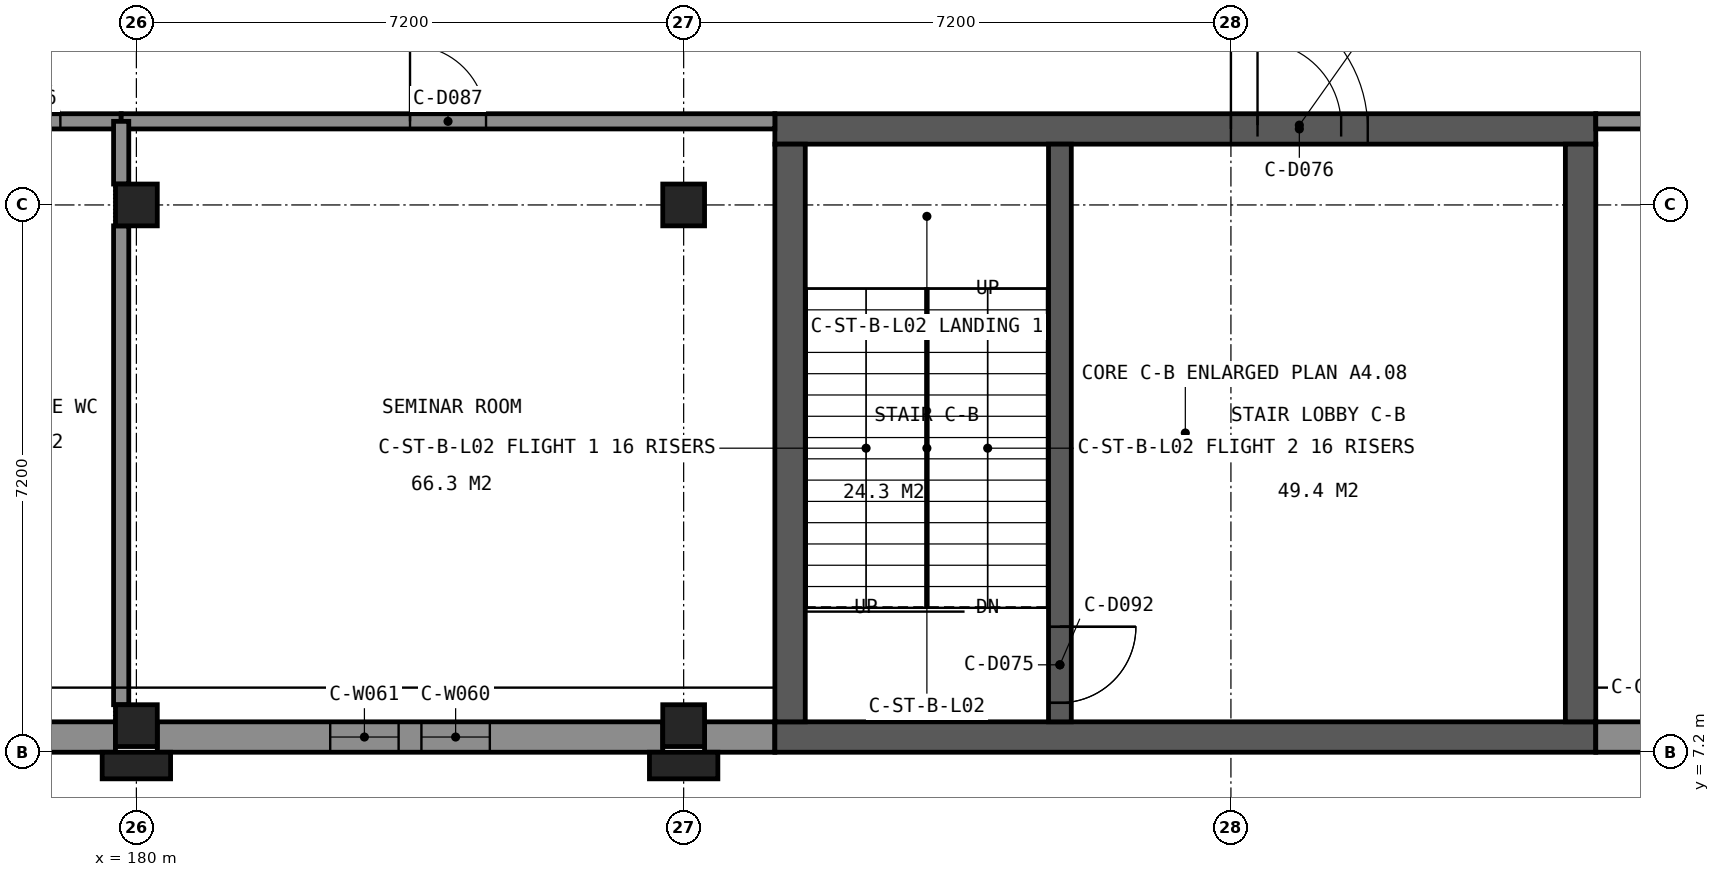
"""IFC4 building model, lengths in metres.
Left out: names, types, materials, properties, quantities, classifications, styles, units other than length and angle.
Written with IfcOpenShell. Run it as: python <this file> out.ifc"""

import sys

from ifc_helpers import new_model, si_unit, direction, frame, frame_2d, origin, origin_2d, place, context, subcontext, project, spatial, polyline, rectangle, outline, extrude, element, fill, save


model = new_model("IFC4")
c1 = context("Model", 3, precision=1e-05, world=origin(), true_north=direction((0.0, 1.0)))
c2 = subcontext(c1, "Body", "Model", "MODEL_VIEW")
j1 = project(units=[si_unit("LENGTHUNIT", "METRE"), si_unit("PLANEANGLEUNIT", "RADIAN")], contexts=[c1])
p1 = place(None, origin())
s1 = spatial("IfcSite", under=j1, at=p1, CompositionType="ELEMENT")
p2 = place(p1, origin())
s2 = spatial("IfcBuilding", under=s1, at=p2, CompositionType="ELEMENT")
p3 = place(p2, frame((0.0, 0.0, 14.4)))
s3 = spatial("IfcBuildingStorey", under=s2, at=p3, CompositionType="ELEMENT", Elevation=14.4)
for number, where, z_axis, x_axis in (
    (1, (180.0, 14.4, 0.0), (0.0, 0.0, 1.0), (1.0, 0.0, 0.0)),
    (2, (187.2, 14.4, 0.0), (0.0, 0.0, 1.0), (1.0, 0.0, 0.0)),
    (3, (180.0, 7.55, 0.0), (0.0, 0.0, 1.0), (1.0, 0.0, 0.0)),
    (4, (187.2, 7.55, 0.0), (0.0, 0.0, 1.0), (1.0, 0.0, 0.0)),
):
    element("IfcColumn", number, at=place(p3, frame(where, z_axis=z_axis, x_axis=x_axis)), inside=s3, PredefinedType="COLUMN", context=c2, shape_type="SweptSolid", body=[
        extrude(rectangle(XDim=0.55, YDim=0.55, at=origin_2d()), origin(), (0.0, 0.0, 1.0), 4.8),
    ])
p4 = place(p3, frame((179.725, 7.4, 0.0), z_axis=(0.0, 0.0, 1.0), x_axis=(-1.0, 0.0, 0.0)))
e5 = element("IfcWall", 5, at=p4, inside=s3, PredefinedType="SOLIDWALL", context=c2, shape_type="SweptSolid", body=[
    extrude(rectangle(XDim=6.65, YDim=0.4, at=frame_2d((3.325, 0.0))), origin(), (0.0, 0.0, 1.0), 3.7),
])
p5 = place(p4, frame((3.475, 0.0, 1.8)))
e6 = element("IfcOpeningElement", 6, at=p5, cuts=e5, PredefinedType="OPENING", context=c2, shape_type="SweptSolid", body=[
    extrude(rectangle(XDim=0.9, YDim=1.2, at=frame_2d((0.45, 0.6))), frame((0.0, 0.21, 0.0), z_axis=(0.0, -1.0, 0.0), x_axis=(1.0, 0.0, 0.0)), (0.0, 0.0, 1.0), 0.42),
])
p6 = place(p3, frame((186.925, 7.4, 0.0), z_axis=(0.0, 0.0, 1.0), x_axis=(-1.0, 0.0, 0.0)))
e7 = element("IfcWall", 7, at=p6, inside=s3, PredefinedType="SOLIDWALL", context=c2, shape_type="SweptSolid", body=[
    extrude(rectangle(XDim=6.65, YDim=0.4, at=frame_2d((3.325, 0.0))), origin(), (0.0, 0.0, 1.0), 3.7),
])
p7 = place(p6, frame((2.275, 0.0, 1.8)))
e8 = element("IfcOpeningElement", 8, at=p7, cuts=e7, PredefinedType="OPENING", context=c2, shape_type="SweptSolid", body=[
    extrude(rectangle(XDim=0.9, YDim=1.2, at=frame_2d((0.45, 0.6))), frame((0.0, 0.21, 0.0), z_axis=(0.0, -1.0, 0.0), x_axis=(1.0, 0.0, 0.0)), (0.0, 0.0, 1.0), 0.42),
])
p8 = place(p6, frame((3.475, 0.0, 1.8)))
e9 = element("IfcOpeningElement", 9, at=p8, cuts=e7, PredefinedType="OPENING", context=c2, shape_type="SweptSolid", body=[
    extrude(rectangle(XDim=0.9, YDim=1.2, at=frame_2d((0.45, 0.6))), frame((0.0, 0.21, 0.0), z_axis=(0.0, -1.0, 0.0), x_axis=(1.0, 0.0, 0.0)), (0.0, 0.0, 1.0), 0.42),
])
p9 = place(p3, frame((188.4, 7.4, 0.0), z_axis=(0.0, 0.0, 1.0), x_axis=(-1.0, 0.0, 0.0)))
e10 = element("IfcWall", 10, at=p9, inside=s3, PredefinedType="SOLIDWALL", context=c2, shape_type="SweptSolid", body=[
    extrude(rectangle(XDim=0.925, YDim=0.4, at=frame_2d((0.462, 0.0))), origin(), (0.0, 0.0, 1.0), 3.7),
])
p10 = place(p3, frame((199.2, 7.4, 0.0), z_axis=(0.0, 0.0, 1.0), x_axis=(-1.0, 0.0, 0.0)))
e11 = element("IfcWall", 11, at=p10, inside=s3, PredefinedType="SHEAR", context=c2, shape_type="SweptSolid", body=[
    extrude(rectangle(XDim=10.8, YDim=0.4, at=frame_2d((5.4, 0.0))), origin(), (0.0, 0.0, 1.0), 4.5),
])
p11 = place(p3, frame((201.325, 7.4, 0.0), z_axis=(0.0, 0.0, 1.0), x_axis=(-1.0, 0.0, 0.0)))
e12 = element("IfcWall", 12, at=p11, inside=s3, PredefinedType="SOLIDWALL", context=c2, shape_type="SweptSolid", body=[
    extrude(rectangle(XDim=2.125, YDim=0.4, at=frame_2d((1.062, 0.0))), origin(), (0.0, 0.0, 1.0), 3.7),
])
p12 = place(p3, frame((188.4, 15.4, 0.0), z_axis=(0.0, 0.0, 1.0), x_axis=(1.0, 0.0, 0.0)))
e13 = element("IfcWall", 13, at=p12, inside=s3, PredefinedType="SHEAR", context=c2, shape_type="SweptSolid", body=[
    extrude(rectangle(XDim=10.8, YDim=0.4, at=frame_2d((5.4, 0.0))), origin(), (0.0, 0.0, 1.0), 4.5),
])
p13 = place(p12, frame((6.0, 0.0, 0.0)))
e14 = element("IfcOpeningElement", 14, at=p13, cuts=e13, PredefinedType="OPENING", context=c2, shape_type="SweptSolid", body=[
    extrude(rectangle(XDim=1.8, YDim=2.1, at=frame_2d((0.9, 1.05))), frame((0.0, 0.21, 0.0), z_axis=(0.0, -1.0, 0.0), x_axis=(1.0, 0.0, 0.0)), (0.0, 0.0, 1.0), 0.42),
])
for number, where, z_axis, x_axis in (
    (15, (188.6, 15.2, 0.0), (0.0, 0.0, 1.0), (0.0, -1.0, 0.0)),
    (16, (199.0, 15.2, 0.0), (0.0, 0.0, 1.0), (0.0, -1.0, 0.0)),
):
    element("IfcWall", number, at=place(p3, frame(where, z_axis=z_axis, x_axis=x_axis)), inside=s3, PredefinedType="SHEAR", context=c2, shape_type="SweptSolid", body=[
        extrude(rectangle(XDim=7.6, YDim=0.4, at=frame_2d((3.8, 0.0))), origin(), (0.0, 0.0, 1.0), 4.5),
    ])
p14 = place(p3, frame((192.15, 15.2, 0.0), z_axis=(0.0, 0.0, 1.0), x_axis=(0.0, -1.0, 0.0)))
e17 = element("IfcWall", 17, at=p14, inside=s3, PredefinedType="SHEAR", context=c2, shape_type="SweptSolid", body=[
    extrude(rectangle(XDim=7.6, YDim=0.3, at=frame_2d((3.8, 0.0))), origin(), (0.0, 0.0, 1.0), 4.5),
])
p15 = place(p14, frame((6.35, 0.0, 0.0)))
e18 = element("IfcOpeningElement", 18, at=p15, cuts=e17, PredefinedType="OPENING", context=c2, shape_type="SweptSolid", body=[
    extrude(rectangle(XDim=1.0, YDim=2.1, at=frame_2d((0.5, 1.05))), frame((0.0, 0.16, 0.0), z_axis=(0.0, -1.0, 0.0), x_axis=(1.0, 0.0, 0.0)), (0.0, 0.0, 1.0), 0.32),
])
p16 = place(p3, frame((188.4, 7.4, 4.8), z_axis=(0.0, 0.0, 1.0), x_axis=(-1.0, 0.0, 0.0)))
e19 = element("IfcWall", 19, at=p16, inside=s3, PredefinedType="PARAPET", context=c2, shape_type="SweptSolid", body=[
    extrude(rectangle(XDim=19.2, YDim=0.4, at=frame_2d((9.6, 0.0))), origin(), (0.0, 0.0, 1.0), 0.4),
])
p17 = place(p3, frame((219.6, 7.4, 4.8), z_axis=(0.0, 0.0, 1.0), x_axis=(-1.0, 0.0, 0.0)))
e20 = element("IfcWall", 20, at=p17, inside=s3, PredefinedType="PARAPET", context=c2, shape_type="SweptSolid", body=[
    extrude(rectangle(XDim=20.4, YDim=0.4, at=frame_2d((10.2, 0.0))), origin(), (0.0, 0.0, 1.0), 0.4),
])
p18 = place(p3, frame((188.4, 15.45, 4.8), z_axis=(0.0, 0.0, 1.0), x_axis=(1.0, 0.0, 0.0)))
e21 = element("IfcWall", 21, at=p18, inside=s3, PredefinedType="SOLIDWALL", context=c2, shape_type="SweptSolid", body=[
    extrude(outline(polyline([(0.0, 0.0), (10.8, 0.0), (10.8, 2.15), (5.4, 2.45), (0.0, 2.15), (0.0, 0.0)])), frame((0.0, 0.15, 0.0), z_axis=(0.0, -1.0, 0.0), x_axis=(1.0, 0.0, 0.0)), (0.0, 0.0, 1.0), 0.3),
])
p19 = place(p18, frame((6.35, 0.0, 0.0)))
e22 = element("IfcOpeningElement", 22, at=p19, cuts=e21, PredefinedType="OPENING", context=c2, shape_type="SweptSolid", body=[
    extrude(rectangle(XDim=1.1, YDim=2.1, at=frame_2d((0.55, 1.05))), frame((0.0, 0.16, 0.0), z_axis=(0.0, -1.0, 0.0), x_axis=(1.0, 0.0, 0.0)), (0.0, 0.0, 1.0), 0.32),
])
p20 = place(p3, frame((188.4, 7.35, 4.8), z_axis=(0.0, 0.0, 1.0), x_axis=(1.0, 0.0, 0.0)))
e23 = element("IfcWall", 23, at=p20, inside=s3, PredefinedType="SOLIDWALL", context=c2, shape_type="SweptSolid", body=[
    extrude(outline(polyline([(0.0, 0.0), (10.8, 0.0), (10.8, 2.15), (5.4, 2.45), (0.0, 2.15), (0.0, 0.0)])), frame((0.0, 0.15, 0.0), z_axis=(0.0, -1.0, 0.0), x_axis=(1.0, 0.0, 0.0)), (0.0, 0.0, 1.0), 0.3),
])
for number, where, z_axis, x_axis in (
    (24, (188.55, 15.3, 4.8), (0.0, 0.0, 1.0), (0.0, -1.0, 0.0)),
    (25, (199.05, 15.3, 4.8), (0.0, 0.0, 1.0), (0.0, -1.0, 0.0)),
):
    element("IfcWall", number, at=place(p3, frame(where, z_axis=z_axis, x_axis=x_axis)), inside=s3, PredefinedType="SOLIDWALL", context=c2, shape_type="SweptSolid", body=[
        extrude(rectangle(XDim=7.8, YDim=0.3, at=frame_2d((3.9, 0.0))), origin(), (0.0, 0.0, 1.0), 2.15),
    ])
p21 = place(p3, frame((192.15, 15.3, 4.8), z_axis=(0.0, 0.0, 1.0), x_axis=(0.0, -1.0, 0.0)))
e26 = element("IfcWall", 26, at=p21, inside=s3, PredefinedType="SOLIDWALL", context=c2, shape_type="SweptSolid", body=[
    extrude(rectangle(XDim=7.8, YDim=0.3, at=frame_2d((3.9, 0.0))), origin(), (0.0, 0.0, 1.0), 2.15),
])
p22 = place(p21, frame((6.45, 0.0, 0.0)))
e27 = element("IfcOpeningElement", 27, at=p22, cuts=e26, PredefinedType="OPENING", context=c2, shape_type="SweptSolid", body=[
    extrude(rectangle(XDim=1.0, YDim=2.1, at=frame_2d((0.5, 1.05))), frame((0.0, 0.16, 0.0), z_axis=(0.0, -1.0, 0.0), x_axis=(1.0, 0.0, 0.0)), (0.0, 0.0, 1.0), 0.32),
])
for number, where, z_axis, x_axis in (
    (28, (180.0, 7.025, 0.0), (0.0, 0.0, 1.0), (1.0, 0.0, 0.0)),
    (29, (187.2, 7.025, 0.0), (0.0, 0.0, 1.0), (1.0, 0.0, 0.0)),
):
    element("IfcColumn", number, at=place(p3, frame(where, z_axis=z_axis, x_axis=x_axis)), inside=s3, PredefinedType="PILASTER", context=c2, shape_type="SweptSolid", body=[
        extrude(rectangle(XDim=0.9, YDim=0.35, at=origin_2d()), origin(), (0.0, 0.0, 1.0), 3.9),
    ])
p23 = place(p3, frame((230.4, 6.575, 4.5), z_axis=(0.0, 0.0, 1.0), x_axis=(-1.0, 0.0, 0.0)))
e30 = element("IfcWall", 30, at=p23, inside=s3, PredefinedType="SOLIDWALL", context=c2, shape_type="SweptSolid", body=[
    extrude(rectangle(XDim=72.75, YDim=0.25, at=frame_2d((36.375, 0.0))), origin(), (0.0, 0.0, 1.0), 0.65),
])
p24 = place(p3, frame((177.2, 15.5, 0.0), z_axis=(0.0, 0.0, 1.0), x_axis=(1.0, 0.0, 0.0)))
e31 = element("IfcWall", 31, at=p24, inside=s3, PredefinedType="PARTITIONING", context=c2, shape_type="SweptSolid", body=[
    extrude(rectangle(XDim=2.6, YDim=0.2, at=frame_2d((1.3, 0.0))), origin(), (0.0, 0.0, 1.0), 3.7),
])
p25 = place(p24, frame((0.8, 0.0, 0.0)))
e32 = element("IfcOpeningElement", 32, at=p25, cuts=e31, PredefinedType="OPENING", context=c2, shape_type="SweptSolid", body=[
    extrude(rectangle(XDim=1.0, YDim=2.1, at=frame_2d((0.5, 1.05))), frame((0.0, 0.11, 0.0), z_axis=(0.0, -1.0, 0.0), x_axis=(1.0, 0.0, 0.0)), (0.0, 0.0, 1.0), 0.22),
])
p26 = place(p3, frame((179.8, 15.5, 0.0), z_axis=(0.0, 0.0, 1.0), x_axis=(1.0, 0.0, 0.0)))
e33 = element("IfcWall", 33, at=p26, inside=s3, PredefinedType="PARTITIONING", context=c2, shape_type="SweptSolid", body=[
    extrude(rectangle(XDim=8.6, YDim=0.2, at=frame_2d((4.3, 0.0))), origin(), (0.0, 0.0, 1.0), 3.7),
])
p27 = place(p26, frame((3.8, 0.0, 0.0)))
e34 = element("IfcOpeningElement", 34, at=p27, cuts=e33, PredefinedType="OPENING", context=c2, shape_type="SweptSolid", body=[
    extrude(rectangle(XDim=1.0, YDim=2.1, at=frame_2d((0.5, 1.05))), frame((0.0, 0.11, 0.0), z_axis=(0.0, -1.0, 0.0), x_axis=(1.0, 0.0, 0.0)), (0.0, 0.0, 1.0), 0.22),
])
p28 = place(p3, frame((199.2, 15.5, 0.0), z_axis=(0.0, 0.0, 1.0), x_axis=(1.0, 0.0, 0.0)))
e35 = element("IfcWall", 35, at=p28, inside=s3, PredefinedType="PARTITIONING", context=c2, shape_type="SweptSolid", body=[
    extrude(rectangle(XDim=13.95, YDim=0.2, at=frame_2d((6.975, 0.0))), origin(), (0.0, 0.0, 1.0), 3.7),
])
p29 = place(p28, frame((6.475, 0.0, 0.0)))
e36 = element("IfcOpeningElement", 36, at=p29, cuts=e35, PredefinedType="OPENING", context=c2, shape_type="SweptSolid", body=[
    extrude(rectangle(XDim=1.0, YDim=2.1, at=frame_2d((0.5, 1.05))), frame((0.0, 0.11, 0.0), z_axis=(0.0, -1.0, 0.0), x_axis=(1.0, 0.0, 0.0)), (0.0, 0.0, 1.0), 0.22),
])
p30 = place(p3, frame((179.8, 15.5, 0.0), z_axis=(0.0, 0.0, 1.0), x_axis=(0.0, -1.0, 0.0)))
e37 = element("IfcWall", 37, at=p30, inside=s3, PredefinedType="PARTITIONING", context=c2, shape_type="SweptSolid", body=[
    extrude(rectangle(XDim=0.825, YDim=0.2, at=frame_2d((0.413, 0.0))), origin(), (0.0, 0.0, 1.0), 3.7),
])
p31 = place(p3, frame((179.8, 14.125, 0.0), z_axis=(0.0, 0.0, 1.0), x_axis=(0.0, -1.0, 0.0)))
e38 = element("IfcWall", 38, at=p31, inside=s3, PredefinedType="PARTITIONING", context=c2, shape_type="SweptSolid", body=[
    extrude(rectangle(XDim=6.3, YDim=0.2, at=frame_2d((3.15, 0.0))), origin(), (0.0, 0.0, 1.0), 3.7),
])
p32 = place(p7, origin())
e39 = element("IfcWindow", 39, at=p32, inside=s3, PartitioningType="SINGLE_PANEL", PredefinedType="WINDOW", context=c2, shape_type="SweptSolid", body=[
    extrude(rectangle(XDim=0.9, YDim=1.2, at=frame_2d((0.45, 0.6))), frame((0.0, -0.09, 0.0), z_axis=(0.0, -1.0, 0.0), x_axis=(1.0, 0.0, 0.0)), (0.0, 0.0, 1.0), 0.06),
])
fill(e8, e39)
p33 = place(p8, origin())
e40 = element("IfcWindow", 40, at=p33, inside=s3, PartitioningType="SINGLE_PANEL", PredefinedType="WINDOW", context=c2, shape_type="SweptSolid", body=[
    extrude(rectangle(XDim=0.9, YDim=1.2, at=frame_2d((0.45, 0.6))), frame((0.0, -0.09, 0.0), z_axis=(0.0, -1.0, 0.0), x_axis=(1.0, 0.0, 0.0)), (0.0, 0.0, 1.0), 0.06),
])
fill(e9, e40)
p34 = place(p15, origin())
e41 = element("IfcDoor", 41, at=p34, inside=s3, OperationType="NOTDEFINED", PredefinedType="DOOR", context=c2, shape_type="SweptSolid", body=[
    extrude(rectangle(XDim=1.0, YDim=2.1, at=frame_2d((0.5, 1.05))), frame((0.0, 0.025, 0.0), z_axis=(0.0, -1.0, 0.0), x_axis=(1.0, 0.0, 0.0)), (0.0, 0.0, 1.0), 0.05),
])
fill(e18, e41)
p35 = place(p13, origin())
e42 = element("IfcDoor", 42, at=p35, inside=s3, OperationType="NOTDEFINED", PredefinedType="DOOR", context=c2, shape_type="SweptSolid", body=[
    extrude(rectangle(XDim=1.8, YDim=2.1, at=frame_2d((0.9, 1.05))), frame((0.0, 0.025, 0.0), z_axis=(0.0, -1.0, 0.0), x_axis=(1.0, 0.0, 0.0)), (0.0, 0.0, 1.0), 0.05),
])
fill(e14, e42)
p36 = place(p25, origin())
e43 = element("IfcDoor", 43, at=p36, inside=s3, OperationType="NOTDEFINED", PredefinedType="DOOR", context=c2, shape_type="SweptSolid", body=[
    extrude(rectangle(XDim=1.0, YDim=2.1, at=frame_2d((0.5, 1.05))), frame((0.0, 0.025, 0.0), z_axis=(0.0, -1.0, 0.0), x_axis=(1.0, 0.0, 0.0)), (0.0, 0.0, 1.0), 0.05),
])
fill(e32, e43)
p37 = place(p27, origin())
e44 = element("IfcDoor", 44, at=p37, inside=s3, OperationType="NOTDEFINED", PredefinedType="DOOR", context=c2, shape_type="SweptSolid", body=[
    extrude(rectangle(XDim=1.0, YDim=2.1, at=frame_2d((0.5, 1.05))), frame((0.0, 0.025, 0.0), z_axis=(0.0, -1.0, 0.0), x_axis=(1.0, 0.0, 0.0)), (0.0, 0.0, 1.0), 0.05),
])
fill(e34, e44)
p38 = place(p22, origin())
e45 = element("IfcDoor", 45, at=p38, inside=s3, OperationType="NOTDEFINED", PredefinedType="DOOR", context=c2, shape_type="SweptSolid", body=[
    extrude(rectangle(XDim=1.0, YDim=2.1, at=frame_2d((0.5, 1.05))), frame((0.0, 0.025, 0.0), z_axis=(0.0, -1.0, 0.0), x_axis=(1.0, 0.0, 0.0)), (0.0, 0.0, 1.0), 0.05),
])
fill(e27, e45)
p39 = place(p19, origin())
e46 = element("IfcDoor", 46, at=p39, inside=s3, OperationType="NOTDEFINED", PredefinedType="DOOR", context=c2, shape_type="SweptSolid", body=[
    extrude(rectangle(XDim=1.1, YDim=2.1, at=frame_2d((0.55, 1.05))), frame((0.0, 0.025, 0.0), z_axis=(0.0, -1.0, 0.0), x_axis=(1.0, 0.0, 0.0)), (0.0, 0.0, 1.0), 0.05),
])
fill(e22, e46)
save(model, sys.argv[1])
